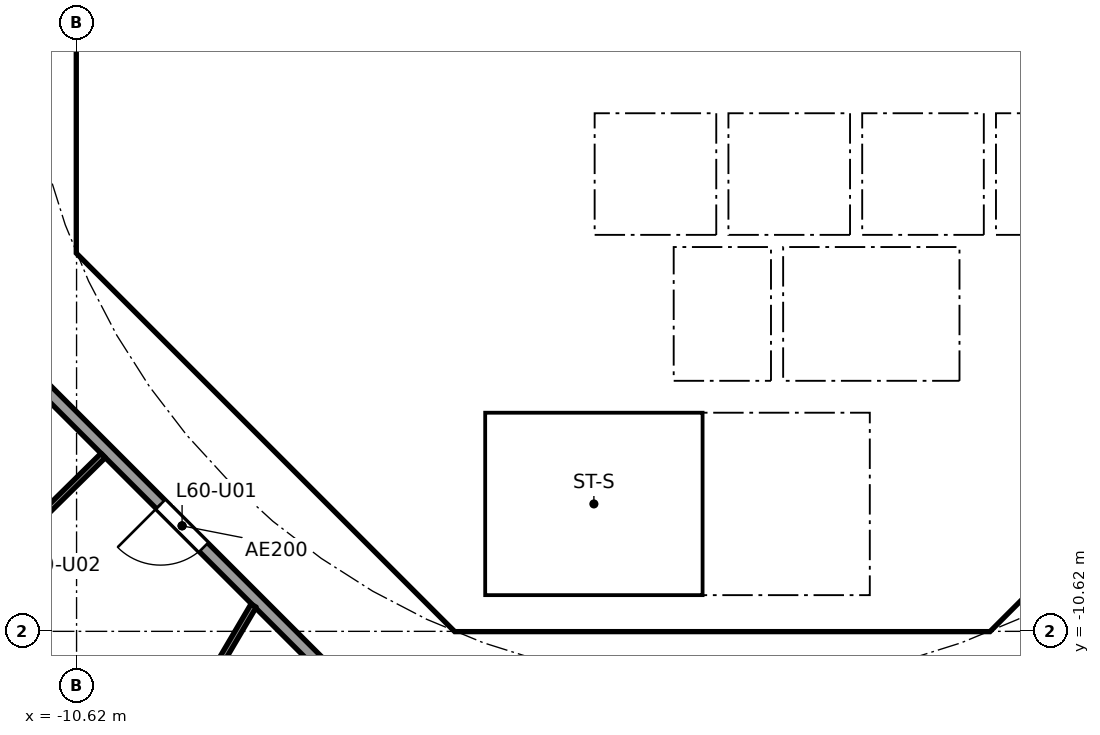
"""IFC4 building model, lengths in metres.
Left out: names, types, materials, properties, quantities, classifications, styles, units other than length and angle.
Written with IfcOpenShell. Run it as: python <this file> out.ifc"""

import sys

from ifc_helpers import new_model, si_unit, direction, frame, frame_2d, origin, place, context, subcontext, project, spatial, polyline, rectangle, outline, extrude, element, fill, save


model = new_model("IFC4")
c1 = context("Model", 3, precision=1e-05, world=origin(), true_north=direction((0.0, 1.0)))
c2 = subcontext(c1, "Body", "Model", "MODEL_VIEW")
j1 = project(units=[si_unit("LENGTHUNIT", "METRE"), si_unit("PLANEANGLEUNIT", "RADIAN")], contexts=[c1])
p1 = place(None, origin())
s1 = spatial("IfcSite", under=j1, at=p1, CompositionType="ELEMENT")
p2 = place(p1, origin())
s2 = spatial("IfcBuilding", under=s1, at=p2, CompositionType="ELEMENT")
p3 = place(p2, frame((0.0, 0.0, 238.1)))
s3 = spatial("IfcBuildingStorey", under=s2, at=p3, CompositionType="ELEMENT", Elevation=238.1)
p4 = place(p3, frame((-10.325, 3.801, 0.0), z_axis=(0.0, 0.0, 1.0), x_axis=(0.0, -1.0, 0.0)))
e1 = element("IfcWall", 1, at=p4, inside=s3, PredefinedType="SHEAR", context=c2, shape_type="SweptSolid", body=[
    extrude(rectangle(XDim=7.602, YDim=0.6, at=frame_2d((3.801, 0.0))), origin(), (0.0, 0.0, 1.0), 3.44),
])
p5 = place(p4, frame((0.651, 0.0, 0.0)))
e2 = element("IfcOpeningElement", 2, at=p5, cuts=e1, PredefinedType="OPENING", context=c2, shape_type="SweptSolid", body=[
    extrude(rectangle(XDim=1.5, YDim=2.1, at=frame_2d((0.75, 1.05))), frame((0.0, 0.31, 0.0), z_axis=(0.0, -1.0, 0.0), x_axis=(1.0, 0.0, 0.0)), (0.0, 0.0, 1.0), 0.62),
])
p6 = place(p4, frame((5.451, 0.0, 0.0)))
e3 = element("IfcOpeningElement", 3, at=p6, cuts=e1, PredefinedType="OPENING", context=c2, shape_type="SweptSolid", body=[
    extrude(rectangle(XDim=1.5, YDim=2.1, at=frame_2d((0.75, 1.05))), frame((0.0, 0.31, 0.0), z_axis=(0.0, -1.0, 0.0), x_axis=(1.0, 0.0, 0.0)), (0.0, 0.0, 1.0), 0.62),
])
p7 = place(p3, frame((-9.988, -4.613, 0.0), z_axis=(0.0, 0.0, 1.0), x_axis=(0.707106781187, -0.707106781187, 0.0)))
e4 = element("IfcWall", 4, at=p7, inside=s3, PredefinedType="SHEAR", context=c2, shape_type="SweptSolid", body=[
    extrude(rectangle(XDim=7.602, YDim=0.6, at=frame_2d((3.801, 0.0))), origin(), (0.0, 0.0, 1.0), 3.44),
])
p8 = place(p7, frame((6.151, 0.0, 0.0)))
e5 = element("IfcOpeningElement", 5, at=p8, cuts=e4, PredefinedType="OPENING", context=c2, shape_type="SweptSolid", body=[
    extrude(rectangle(XDim=1.1, YDim=2.1, at=frame_2d((0.55, 1.05))), frame((0.0, 0.31, 0.0), z_axis=(0.0, -1.0, 0.0), x_axis=(1.0, 0.0, 0.0)), (0.0, 0.0, 1.0), 0.62),
])
p9 = place(p3, frame((4.613, -9.988, 0.0), z_axis=(0.0, 0.0, 1.0), x_axis=(0.707106781187, 0.707106781187, 0.0)))
e6 = element("IfcWall", 6, at=p9, inside=s3, PredefinedType="SHEAR", context=c2, shape_type="SweptSolid", body=[
    extrude(rectangle(XDim=7.602, YDim=0.6, at=frame_2d((3.801, 0.0))), origin(), (0.0, 0.0, 1.0), 3.44),
])
p10 = place(p9, frame((3.201, 0.0, 0.0)))
e7 = element("IfcOpeningElement", 7, at=p10, cuts=e6, PredefinedType="OPENING", context=c2, shape_type="SweptSolid", body=[
    extrude(rectangle(XDim=1.2, YDim=2.1, at=frame_2d((0.6, 1.05))), frame((0.0, 0.31, 0.0), z_axis=(0.0, -1.0, 0.0), x_axis=(1.0, 0.0, 0.0)), (0.0, 0.0, 1.0), 0.62),
])
p11 = place(p3, frame((4.0, -10.025, 0.0), z_axis=(0.0, 0.0, 1.0), x_axis=(0.0, 1.0, 0.0)))
e8 = element("IfcWall", 8, at=p11, inside=s3, PredefinedType="SOLIDWALL", context=c2, shape_type="SweptSolid", body=[
    extrude(rectangle(XDim=3.0, YDim=0.2, at=frame_2d((1.5, 0.0))), origin(), (0.0, 0.0, 1.0), 3.44),
])
p12 = place(p11, frame((0.975, 0.0, 0.0)))
e9 = element("IfcOpeningElement", 9, at=p12, cuts=e8, PredefinedType="OPENING", context=c2, shape_type="SweptSolid", body=[
    extrude(rectangle(XDim=1.1, YDim=2.1, at=frame_2d((0.55, 1.05))), frame((0.0, 0.11, 0.0), z_axis=(0.0, -1.0, 0.0), x_axis=(1.0, 0.0, 0.0)), (0.0, 0.0, 1.0), 0.22),
])
p13 = place(p3, frame((-7.4, -6.627, 0.0), z_axis=(0.0, 0.0, 1.0), x_axis=(0.0, 1.0, 0.0)))
e10 = element("IfcWall", 10, at=p13, inside=s3, PredefinedType="PARTITIONING", context=c2, shape_type="SweptSolid", body=[
    extrude(rectangle(XDim=2.527, YDim=0.15, at=frame_2d((1.263, 0.0))), origin(), (0.0, 0.0, 1.0), 3.44),
])
p14 = place(p13, frame((0.776, 0.0, 0.0)))
e11 = element("IfcOpeningElement", 11, at=p14, cuts=e10, PredefinedType="OPENING", context=c2, shape_type="SweptSolid", body=[
    extrude(rectangle(XDim=0.9, YDim=2.1, at=frame_2d((0.45, 1.05))), frame((0.0, 0.085, 0.0), z_axis=(0.0, -1.0, 0.0), x_axis=(1.0, 0.0, 0.0)), (0.0, 0.0, 1.0), 0.17),
])
p15 = place(p3, frame((4.0, -6.5, 0.0), z_axis=(0.0, 0.0, 1.0), x_axis=(0.0, 1.0, 0.0)))
e12 = element("IfcWall", 12, at=p15, inside=s3, PredefinedType="SOLIDWALL", context=c2, shape_type="SweptSolid", body=[
    extrude(rectangle(XDim=2.2, YDim=0.2, at=frame_2d((1.1, 0.0))), origin(), (0.0, 0.0, 1.0), 3.44),
])
p16 = place(p15, frame((0.55, 0.0, 0.0)))
e13 = element("IfcOpeningElement", 13, at=p16, cuts=e12, PredefinedType="OPENING", context=c2, shape_type="SweptSolid", body=[
    extrude(rectangle(XDim=1.1, YDim=2.1, at=frame_2d((0.55, 1.05))), frame((0.0, 0.11, 0.0), z_axis=(0.0, -1.0, 0.0), x_axis=(1.0, 0.0, 0.0)), (0.0, 0.0, 1.0), 0.22),
])
p17 = place(p3, frame((-4.0, -6.5, 0.0), z_axis=(0.0, 0.0, 1.0), x_axis=(0.0, 1.0, 0.0)))
e14 = element("IfcWall", 14, at=p17, inside=s3, PredefinedType="SOLIDWALL", context=c2, shape_type="SweptSolid", body=[
    extrude(rectangle(XDim=2.2, YDim=0.2, at=frame_2d((1.1, 0.0))), origin(), (0.0, 0.0, 1.0), 3.44),
])
p18 = place(p17, frame((0.65, 0.0, 0.0)))
e15 = element("IfcOpeningElement", 15, at=p18, cuts=e14, PredefinedType="OPENING", context=c2, shape_type="SweptSolid", body=[
    extrude(rectangle(XDim=0.9, YDim=2.1, at=frame_2d((0.45, 1.05))), frame((0.0, 0.11, 0.0), z_axis=(0.0, -1.0, 0.0), x_axis=(1.0, 0.0, 0.0)), (0.0, 0.0, 1.0), 0.22),
])
p19 = place(p3, frame((-6.7, -2.0, 0.0), z_axis=(0.0, 0.0, 1.0), x_axis=(1.0, 0.0, 0.0)))
e16 = element("IfcWall", 16, at=p19, inside=s3, PredefinedType="SOLIDWALL", context=c2, shape_type="SweptSolid", body=[
    extrude(rectangle(XDim=13.4, YDim=0.2, at=frame_2d((6.7, 0.0))), origin(), (0.0, 0.0, 1.0), 3.44),
])
p20 = place(p19, frame((5.05, 0.0, 0.0)))
e17 = element("IfcOpeningElement", 17, at=p20, cuts=e16, PredefinedType="OPENING", context=c2, shape_type="SweptSolid", body=[
    extrude(rectangle(XDim=1.1, YDim=2.1, at=frame_2d((0.55, 1.05))), frame((0.0, 0.11, 0.0), z_axis=(0.0, -1.0, 0.0), x_axis=(1.0, 0.0, 0.0)), (0.0, 0.0, 1.0), 0.22),
])
p21 = place(p19, frame((7.25, 0.0, 0.0)))
e18 = element("IfcOpeningElement", 18, at=p21, cuts=e16, PredefinedType="OPENING", context=c2, shape_type="SweptSolid", body=[
    extrude(rectangle(XDim=1.1, YDim=2.1, at=frame_2d((0.55, 1.05))), frame((0.0, 0.11, 0.0), z_axis=(0.0, -1.0, 0.0), x_axis=(1.0, 0.0, 0.0)), (0.0, 0.0, 1.0), 0.22),
])
p22 = place(p19, frame((0.75, 0.0, 0.0)))
e19 = element("IfcOpeningElement", 19, at=p22, cuts=e16, PredefinedType="OPENING", context=c2, shape_type="SweptSolid", body=[
    extrude(rectangle(XDim=0.9, YDim=2.1, at=frame_2d((0.45, 1.05))), frame((0.0, 0.11, 0.0), z_axis=(0.0, -1.0, 0.0), x_axis=(1.0, 0.0, 0.0)), (0.0, 0.0, 1.0), 0.22),
])
p23 = place(p19, frame((2.95, 0.0, 0.0)))
e20 = element("IfcOpeningElement", 20, at=p23, cuts=e16, PredefinedType="OPENING", context=c2, shape_type="SweptSolid", body=[
    extrude(rectangle(XDim=0.9, YDim=2.1, at=frame_2d((0.45, 1.05))), frame((0.0, 0.11, 0.0), z_axis=(0.0, -1.0, 0.0), x_axis=(1.0, 0.0, 0.0)), (0.0, 0.0, 1.0), 0.22),
])
p24 = place(p3, origin())
e21 = element("IfcWall", 21, at=p24, inside=s3, PredefinedType="SHEAR", context=c2, shape_type="SweptSolid", body=[
    extrude(outline(polyline([(-10.625, -3.801), (-10.025, -3.801), (-10.025, -4.152), (-9.776, -4.401), (-10.2, -4.825), (-10.625, -4.401), (-10.625, -3.801)])), origin(), (0.0, 0.0, 1.0), 3.44),
])
p25 = place(p3, origin())
e22 = element("IfcWall", 22, at=p25, inside=s3, PredefinedType="SHEAR", context=c2, shape_type="SweptSolid", body=[
    extrude(outline(polyline([(-4.152, -10.025), (4.152, -10.025), (4.401, -9.776), (4.825, -10.2), (4.401, -10.625), (-4.401, -10.625), (-4.825, -10.2), (-4.401, -9.776), (-4.152, -10.025)])), origin(), (0.0, 0.0, 1.0), 3.44),
])
for number, where, z_axis, x_axis in (
    (23, (-0.9, -6.5, 0.0), (0.0, 0.0, 1.0), (0.0, 1.0, 0.0)),
    (24, (0.9, -6.5, 0.0), (0.0, 0.0, 1.0), (0.0, 1.0, 0.0)),
):
    element("IfcWall", number, at=place(p3, frame(where, z_axis=z_axis, x_axis=x_axis)), inside=s3, PredefinedType="SOLIDWALL", context=c2, shape_type="SweptSolid", body=[
        extrude(rectangle(XDim=2.2, YDim=0.2, at=frame_2d((1.1, 0.0))), origin(), (0.0, 0.0, 1.0), 3.44),
    ])
p26 = place(p3, origin())
e25 = element("IfcWall", 25, at=p26, inside=s3, PredefinedType="SOLIDWALL", context=c2, shape_type="SweptSolid", body=[
    extrude(outline(polyline([(-6.7, -2.1), (-6.5, -2.1), (-6.5, -4.1), (-4.5, -4.1), (-4.5, -2.1), (-4.3, -2.1), (-4.3, -4.1), (-2.3, -4.1), (-2.3, -2.1), (-2.1, -2.1), (-2.1, -4.1), (-0.1, -4.1), (-0.1, -2.1), (0.1, -2.1), (0.1, -4.1), (2.1, -4.1), (2.1, -2.1), (2.3, -2.1), (2.3, -4.1), (4.3, -4.1), (4.3, -2.1), (4.5, -2.1), (4.5, -4.1), (6.5, -4.1), (6.5, -2.1), (6.7, -2.1), (6.7, -4.3), (-6.7, -4.3), (-6.7, -2.1)])), origin(), (0.0, 0.0, 1.0), 3.44),
])
p27 = place(p3, frame((-10.025, -4.0, 0.0), z_axis=(0.0, 0.0, 1.0), x_axis=(1.0, 0.0, 0.0)))
e26 = element("IfcWall", 26, at=p27, inside=s3, PredefinedType="PARTITIONING", context=c2, shape_type="SweptSolid", body=[
    extrude(rectangle(XDim=3.325, YDim=0.2, at=frame_2d((1.662, 0.0))), origin(), (0.0, 0.0, 1.0), 3.44),
])
p28 = place(p3, origin())
e27 = element("IfcWall", 27, at=p28, inside=s3, PredefinedType="SOLIDWALL", context=c2, shape_type="SweptSolid", body=[
    extrude(outline(polyline([(-3.9, -10.025), (-4.1, -10.025), (-4.1, -7.025), (-3.9, -7.025), (-3.9, -10.025)])), origin(), (0.0, 0.0, 1.0), 3.44),
])
p29 = place(p3, origin())
e28 = element("IfcWall", 28, at=p29, inside=s3, PredefinedType="SOLIDWALL", context=c2, shape_type="SweptSolid", body=[
    extrude(outline(polyline([(4.1, -7.025), (-4.1, -7.025), (-4.1, -6.5), (4.1, -6.5), (4.1, -7.025)])), origin(), (0.0, 0.0, 1.0), 3.44),
])
p30 = place(p3, frame((-12.635, -5.134, 0.0), z_axis=(0.0, 0.0, 1.0), x_axis=(0.707106781187, -0.707106781187, 0.0)))
e29 = element("IfcWall", 29, at=p30, inside=s3, PredefinedType="PARTITIONING", context=c2, shape_type="SweptSolid", body=[
    extrude(rectangle(XDim=10.609, YDim=0.2, at=frame_2d((5.305, 0.0))), origin(), (0.0, 0.0, 1.0), 3.44),
])
p31 = place(p30, frame((4.804, 0.0, 0.0)))
e30 = element("IfcOpeningElement", 30, at=p31, cuts=e29, PredefinedType="OPENING", context=c2, shape_type="SweptSolid", body=[
    extrude(rectangle(XDim=1.0, YDim=2.1, at=frame_2d((0.5, 1.05))), frame((0.0, 0.11, 0.0), z_axis=(0.0, -1.0, 0.0), x_axis=(1.0, 0.0, 0.0)), (0.0, 0.0, 1.0), 0.22),
])
p32 = place(p3, frame((-10.183, -7.728, 0.0), z_axis=(0.0, 0.0, 1.0), x_axis=(-0.711869910979, -0.702311348223, 0.0)))
e31 = element("IfcWall", 31, at=p32, inside=s3, PredefinedType="PARTITIONING", context=c2, shape_type="SweptSolid", body=[
    extrude(rectangle(XDim=7.535, YDim=0.1, at=frame_2d((3.767, 0.0))), origin(), (0.0, 0.0, 1.0), 2.762),
])
p33 = place(p32, frame((1.335, 0.0, 0.0)))
e32 = element("IfcOpeningElement", 32, at=p33, cuts=e31, PredefinedType="OPENING", context=c2, shape_type="SweptSolid", body=[
    extrude(rectangle(XDim=0.9, YDim=2.1, at=frame_2d((0.45, 1.05))), frame((0.0, 0.06, 0.0), z_axis=(0.0, -1.0, 0.0), x_axis=(1.0, 0.0, 0.0)), (0.0, 0.0, 1.0), 0.12),
])
p34 = place(p32, frame((5.077, 0.0, 0.0)))
e33 = element("IfcOpeningElement", 33, at=p34, cuts=e31, PredefinedType="OPENING", context=c2, shape_type="SweptSolid", body=[
    extrude(rectangle(XDim=0.9, YDim=2.1, at=frame_2d((0.45, 1.05))), frame((0.0, 0.06, 0.0), z_axis=(0.0, -1.0, 0.0), x_axis=(1.0, 0.0, 0.0)), (0.0, 0.0, 1.0), 0.12),
])
p35 = place(p3, frame((-7.709, -10.198, 0.0), z_axis=(0.0, 0.0, 1.0), x_axis=(-0.507355901053, -0.8617366127, 0.0)))
e34 = element("IfcWall", 34, at=p35, inside=s3, PredefinedType="PARTITIONING", context=c2, shape_type="SweptSolid", body=[
    extrude(rectangle(XDim=11.025, YDim=0.1, at=frame_2d((5.512, 0.0))), origin(), (0.0, 0.0, 1.0), 2.762),
])
p36 = place(p35, frame((1.326, 0.0, 0.0)))
e35 = element("IfcOpeningElement", 35, at=p36, cuts=e34, PredefinedType="OPENING", context=c2, shape_type="SweptSolid", body=[
    extrude(rectangle(XDim=0.9, YDim=2.1, at=frame_2d((0.45, 1.05))), frame((0.0, 0.06, 0.0), z_axis=(0.0, -1.0, 0.0), x_axis=(1.0, 0.0, 0.0)), (0.0, 0.0, 1.0), 0.12),
])
p37 = place(p35, frame((5.05, 0.0, 0.0)))
e36 = element("IfcOpeningElement", 36, at=p37, cuts=e34, PredefinedType="OPENING", context=c2, shape_type="SweptSolid", body=[
    extrude(rectangle(XDim=0.9, YDim=2.1, at=frame_2d((0.45, 1.05))), frame((0.0, 0.06, 0.0), z_axis=(0.0, -1.0, 0.0), x_axis=(1.0, 0.0, 0.0)), (0.0, 0.0, 1.0), 0.12),
])
p38 = place(p35, frame((8.787, 0.0, 0.0)))
e37 = element("IfcOpeningElement", 37, at=p38, cuts=e34, PredefinedType="OPENING", context=c2, shape_type="SweptSolid", body=[
    extrude(rectangle(XDim=0.9, YDim=2.1, at=frame_2d((0.45, 1.05))), frame((0.0, 0.06, 0.0), z_axis=(0.0, -1.0, 0.0), x_axis=(1.0, 0.0, 0.0)), (0.0, 0.0, 1.0), 0.12),
])
p39 = place(p20, origin())
e38 = element("IfcDoor", 38, at=p39, inside=s3, OperationType="DOUBLE_DOOR_SLIDING", PredefinedType="DOOR", context=c2, shape_type="SweptSolid", body=[
    extrude(rectangle(XDim=1.1, YDim=2.1, at=frame_2d((0.55, 1.05))), frame((0.0, 0.025, 0.0), z_axis=(0.0, -1.0, 0.0), x_axis=(1.0, 0.0, 0.0)), (0.0, 0.0, 1.0), 0.05),
])
fill(e17, e38)
p40 = place(p21, origin())
e39 = element("IfcDoor", 39, at=p40, inside=s3, OperationType="DOUBLE_DOOR_SLIDING", PredefinedType="DOOR", context=c2, shape_type="SweptSolid", body=[
    extrude(rectangle(XDim=1.1, YDim=2.1, at=frame_2d((0.55, 1.05))), frame((0.0, 0.025, 0.0), z_axis=(0.0, -1.0, 0.0), x_axis=(1.0, 0.0, 0.0)), (0.0, 0.0, 1.0), 0.05),
])
fill(e18, e39)
p41 = place(p16, origin())
e40 = element("IfcDoor", 40, at=p41, inside=s3, OperationType="DOUBLE_DOOR_SLIDING", PredefinedType="DOOR", context=c2, shape_type="SweptSolid", body=[
    extrude(rectangle(XDim=1.1, YDim=2.1, at=frame_2d((0.55, 1.05))), frame((0.0, 0.025, 0.0), z_axis=(0.0, -1.0, 0.0), x_axis=(1.0, 0.0, 0.0)), (0.0, 0.0, 1.0), 0.05),
])
fill(e13, e40)
p42 = place(p12, origin())
e41 = element("IfcDoor", 41, at=p42, inside=s3, OperationType="SINGLE_SWING_RIGHT", PredefinedType="DOOR", context=c2, shape_type="SweptSolid", body=[
    extrude(rectangle(XDim=1.1, YDim=2.1, at=frame_2d((0.55, 1.05))), frame((0.0, 0.025, 0.0), z_axis=(0.0, -1.0, 0.0), x_axis=(1.0, 0.0, 0.0)), (0.0, 0.0, 1.0), 0.05),
])
fill(e9, e41)
p43 = place(p14, origin())
e42 = element("IfcDoor", 42, at=p43, inside=s3, OperationType="SINGLE_SWING_RIGHT", PredefinedType="DOOR", context=c2, shape_type="SweptSolid", body=[
    extrude(rectangle(XDim=0.9, YDim=2.1, at=frame_2d((0.45, 1.05))), frame((0.0, 0.025, 0.0), z_axis=(0.0, -1.0, 0.0), x_axis=(1.0, 0.0, 0.0)), (0.0, 0.0, 1.0), 0.05),
])
fill(e11, e42)
p44 = place(p18, frame((0.9, 0.0, 0.0), x_axis=(-1.0, 0.0, 0.0)))
e43 = element("IfcDoor", 43, at=p44, inside=s3, OperationType="SINGLE_SWING_RIGHT", PredefinedType="DOOR", context=c2, shape_type="SweptSolid", body=[
    extrude(rectangle(XDim=0.9, YDim=2.1, at=frame_2d((0.45, 1.05))), frame((0.0, 0.025, 0.0), z_axis=(0.0, -1.0, 0.0), x_axis=(1.0, 0.0, 0.0)), (0.0, 0.0, 1.0), 0.05),
])
fill(e15, e43)
p45 = place(p22, frame((0.9, 0.0, 0.0), x_axis=(-1.0, 0.0, 0.0)))
e44 = element("IfcDoor", 44, at=p45, inside=s3, OperationType="SINGLE_SWING_RIGHT", PredefinedType="DOOR", context=c2, shape_type="SweptSolid", body=[
    extrude(rectangle(XDim=0.9, YDim=2.1, at=frame_2d((0.45, 1.05))), frame((0.0, 0.025, 0.0), z_axis=(0.0, -1.0, 0.0), x_axis=(1.0, 0.0, 0.0)), (0.0, 0.0, 1.0), 0.05),
])
fill(e19, e44)
p46 = place(p23, frame((0.9, 0.0, 0.0), x_axis=(-1.0, 0.0, 0.0)))
e45 = element("IfcDoor", 45, at=p46, inside=s3, OperationType="SINGLE_SWING_RIGHT", PredefinedType="DOOR", context=c2, shape_type="SweptSolid", body=[
    extrude(rectangle(XDim=0.9, YDim=2.1, at=frame_2d((0.45, 1.05))), frame((0.0, 0.025, 0.0), z_axis=(0.0, -1.0, 0.0), x_axis=(1.0, 0.0, 0.0)), (0.0, 0.0, 1.0), 0.05),
])
fill(e20, e45)
p47 = place(p6, origin())
e46 = element("IfcDoor", 46, at=p47, inside=s3, OperationType="DOUBLE_DOOR_SINGLE_SWING", PredefinedType="DOOR", context=c2, shape_type="SweptSolid", body=[
    extrude(rectangle(XDim=1.5, YDim=2.1, at=frame_2d((0.75, 1.05))), frame((0.0, 0.025, 0.0), z_axis=(0.0, -1.0, 0.0), x_axis=(1.0, 0.0, 0.0)), (0.0, 0.0, 1.0), 0.05),
])
fill(e3, e46)
p48 = place(p8, origin())
e47 = element("IfcDoor", 47, at=p48, inside=s3, OperationType="SINGLE_SWING_LEFT", PredefinedType="DOOR", context=c2, shape_type="SweptSolid", body=[
    extrude(rectangle(XDim=1.1, YDim=2.1, at=frame_2d((0.55, 1.05))), frame((0.0, 0.025, 0.0), z_axis=(0.0, -1.0, 0.0), x_axis=(1.0, 0.0, 0.0)), (0.0, 0.0, 1.0), 0.05),
])
fill(e5, e47)
p49 = place(p31, frame((1.0, 0.0, 0.0), x_axis=(-1.0, 0.0, 0.0)))
e48 = element("IfcDoor", 48, at=p49, inside=s3, OperationType="SINGLE_SWING_RIGHT", PredefinedType="DOOR", context=c2, shape_type="SweptSolid", body=[
    extrude(rectangle(XDim=1.0, YDim=2.1, at=frame_2d((0.5, 1.05))), frame((0.0, 0.025, 0.0), z_axis=(0.0, -1.0, 0.0), x_axis=(1.0, 0.0, 0.0)), (0.0, 0.0, 1.0), 0.05),
])
fill(e30, e48)
save(model, sys.argv[1])
